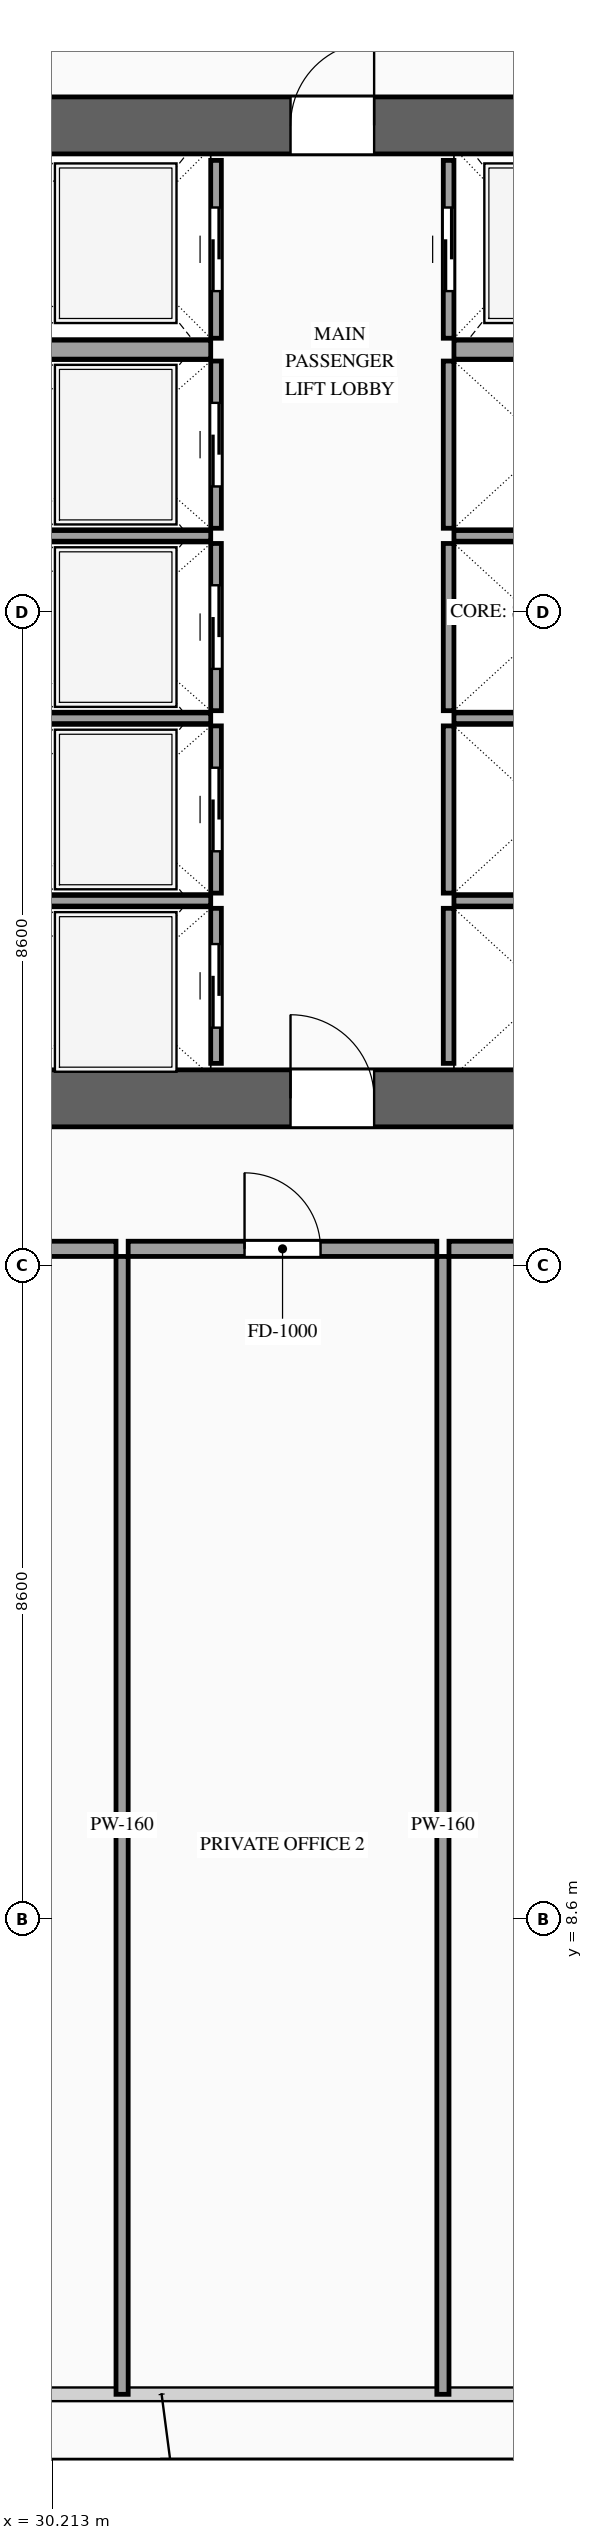
"""IFC4 building model, lengths in metres.
Left out: names, types, materials, properties, quantities, classifications, styles, units other than length and angle.
Written with IfcOpenShell. Run it as: python <this file> out.ifc"""

import sys

from ifc_helpers import new_model, si_unit, direction, frame, frame_2d, origin, place, context, subcontext, project, spatial, rectangle, extrude, source, transform, mapped, element, fill, save


model = new_model("IFC4")
c1 = context("Model", 3, precision=1e-05, world=origin(), true_north=direction((0.0, 1.0)))
c2 = subcontext(c1, "Body", "Model", "MODEL_VIEW")
j1 = project(units=[si_unit("LENGTHUNIT", "METRE"), si_unit("PLANEANGLEUNIT", "RADIAN")], contexts=[c1])
p1 = place(None, origin())
s1 = spatial("IfcSite", under=j1, at=p1, CompositionType="ELEMENT")
p2 = place(p1, origin())
s2 = spatial("IfcBuilding", under=s1, at=p2, CompositionType="ELEMENT")
p3 = place(p2, frame((0.0, 0.0, 152.4)))
s3 = spatial("IfcBuildingStorey", under=s2, at=p3, CompositionType="ELEMENT", Elevation=152.4)
p4 = place(p3, frame((23.425, 19.4, 0.0), z_axis=(0.0, 0.0, 1.0), x_axis=(1.0, 0.0, 0.0)))
e1 = element("IfcWall", 1, at=p4, inside=s3, PredefinedType="SHEAR", context=c2, shape_type="SweptSolid", body=[
    extrude(rectangle(XDim=27.15, YDim=0.75, at=frame_2d((13.575, 0.0))), origin(), (0.0, 0.0, 1.0), 3.6),
])
p5 = place(p4, frame((2.025, 0.0, 0.0)))
e2 = element("IfcOpeningElement", 2, at=p5, cuts=e1, PredefinedType="OPENING", context=c2, shape_type="SweptSolid", body=[
    extrude(rectangle(XDim=1.1, YDim=2.2, at=frame_2d((0.55, 1.1))), frame((0.0, 0.39, 0.0), z_axis=(0.0, -1.0, 0.0), x_axis=(1.0, 0.0, 0.0)), (0.0, 0.0, 1.0), 0.78),
])
p6 = place(p4, frame((9.925, 0.0, 0.0)))
e3 = element("IfcOpeningElement", 3, at=p6, cuts=e1, PredefinedType="OPENING", context=c2, shape_type="SweptSolid", body=[
    extrude(rectangle(XDim=1.1, YDim=2.2, at=frame_2d((0.55, 1.1))), frame((0.0, 0.39, 0.0), z_axis=(0.0, -1.0, 0.0), x_axis=(1.0, 0.0, 0.0)), (0.0, 0.0, 1.0), 0.78),
])
p7 = place(p4, frame((23.125, 0.0, 0.0)))
e4 = element("IfcOpeningElement", 4, at=p7, cuts=e1, PredefinedType="OPENING", context=c2, shape_type="SweptSolid", body=[
    extrude(rectangle(XDim=1.1, YDim=2.2, at=frame_2d((0.55, 1.1))), frame((0.0, 0.39, 0.0), z_axis=(0.0, -1.0, 0.0), x_axis=(1.0, 0.0, 0.0)), (0.0, 0.0, 1.0), 0.78),
])
p8 = place(p4, frame((19.745, 0.0, 0.0)))
e5 = element("IfcOpeningElement", 5, at=p8, cuts=e1, PredefinedType="OPENING", context=c2, shape_type="SweptSolid", body=[
    extrude(rectangle(XDim=0.9, YDim=2.15, at=frame_2d((0.45, 1.075))), frame((0.0, 0.39, 0.0), z_axis=(0.0, -1.0, 0.0), x_axis=(1.0, 0.0, 0.0)), (0.0, 0.0, 1.0), 0.78),
])
p9 = place(p4, frame((18.305, 0.0, 0.0)))
e6 = element("IfcOpeningElement", 6, at=p9, cuts=e1, PredefinedType="OPENING", context=c2, shape_type="SweptSolid", body=[
    extrude(rectangle(XDim=0.9, YDim=2.15, at=frame_2d((0.45, 1.075))), frame((0.0, 0.39, 0.0), z_axis=(0.0, -1.0, 0.0), x_axis=(1.0, 0.0, 0.0)), (0.0, 0.0, 1.0), 0.78),
])
p10 = place(p3, frame((23.425, 32.2, 0.0), z_axis=(0.0, 0.0, 1.0), x_axis=(1.0, 0.0, 0.0)))
e7 = element("IfcWall", 7, at=p10, inside=s3, PredefinedType="SHEAR", context=c2, shape_type="SweptSolid", body=[
    extrude(rectangle(XDim=27.15, YDim=0.75, at=frame_2d((13.575, 0.0))), origin(), (0.0, 0.0, 1.0), 3.6),
])
p11 = place(p10, frame((4.645, 0.0, 0.0)))
e8 = element("IfcOpeningElement", 8, at=p11, cuts=e7, PredefinedType="OPENING", context=c2, shape_type="SweptSolid", body=[
    extrude(rectangle(XDim=0.9, YDim=2.15, at=frame_2d((0.45, 1.075))), frame((0.0, 0.39, 0.0), z_axis=(0.0, -1.0, 0.0), x_axis=(1.0, 0.0, 0.0)), (0.0, 0.0, 1.0), 0.78),
])
p12 = place(p10, frame((9.925, 0.0, 0.0)))
e9 = element("IfcOpeningElement", 9, at=p12, cuts=e7, PredefinedType="OPENING", context=c2, shape_type="SweptSolid", body=[
    extrude(rectangle(XDim=1.1, YDim=2.2, at=frame_2d((0.55, 1.1))), frame((0.0, 0.39, 0.0), z_axis=(0.0, -1.0, 0.0), x_axis=(1.0, 0.0, 0.0)), (0.0, 0.0, 1.0), 0.78),
])
p13 = place(p10, frame((15.775, 0.0, 0.0)))
e10 = element("IfcOpeningElement", 10, at=p13, cuts=e7, PredefinedType="OPENING", context=c2, shape_type="SweptSolid", body=[
    extrude(rectangle(XDim=1.1, YDim=2.2, at=frame_2d((0.55, 1.1))), frame((0.0, 0.39, 0.0), z_axis=(0.0, -1.0, 0.0), x_axis=(1.0, 0.0, 0.0)), (0.0, 0.0, 1.0), 0.78),
])
p14 = place(p10, frame((19.745, 0.0, 0.0)))
e11 = element("IfcOpeningElement", 11, at=p14, cuts=e7, PredefinedType="OPENING", context=c2, shape_type="SweptSolid", body=[
    extrude(rectangle(XDim=0.9, YDim=2.15, at=frame_2d((0.45, 1.075))), frame((0.0, 0.39, 0.0), z_axis=(0.0, -1.0, 0.0), x_axis=(1.0, 0.0, 0.0)), (0.0, 0.0, 1.0), 0.78),
])
p15 = place(p3, frame((32.37, 19.86, 0.0), z_axis=(0.0, 0.0, 1.0), x_axis=(0.0, 1.0, 0.0)))
e12 = element("IfcWall", 12, at=p15, inside=s3, PredefinedType="SOLIDWALL", context=c2, shape_type="SweptSolid", body=[
    extrude(rectangle(XDim=2.04, YDim=0.14, at=frame_2d((1.02, 0.0))), origin(), (0.0, 0.0, 1.0), 3.38),
])
p16 = place(p15, frame((0.47, 0.0, 0.0)))
e13 = element("IfcOpeningElement", 13, at=p16, cuts=e12, PredefinedType="OPENING", context=c2, shape_type="SweptSolid", body=[
    extrude(rectangle(XDim=1.1, YDim=2.2, at=frame_2d((0.55, 1.1))), frame((0.0, 0.085, 0.0), z_axis=(0.0, -1.0, 0.0), x_axis=(1.0, 0.0, 0.0)), (0.0, 0.0, 1.0), 0.17),
])
m1 = source(origin(), c2, "Body", "SweptSolid", [
    extrude(rectangle(XDim=2.5, YDim=0.14, at=frame_2d((1.25, 0.0))), origin(), (0.0, 0.0, 1.0), 3.38),
])
p17 = place(p3, frame((29.8, 22.0, 0.0), z_axis=(0.0, 0.0, 1.0), x_axis=(1.0, 0.0, 0.0)))
e14 = element("IfcWall", 14, at=p17, inside=s3, PredefinedType="SOLIDWALL", context=c2, shape_type="MappedRepresentation", body=[
    mapped(m1, transform((0.0, 0.0, 0.0), scale=1.0)),
])
p18 = place(p3, frame((32.37, 22.1, 0.0), z_axis=(0.0, 0.0, 1.0), x_axis=(0.0, 1.0, 0.0)))
e15 = element("IfcWall", 15, at=p18, inside=s3, PredefinedType="SOLIDWALL", context=c2, shape_type="SweptSolid", body=[
    extrude(rectangle(XDim=2.2, YDim=0.14, at=frame_2d((1.1, 0.0))), origin(), (0.0, 0.0, 1.0), 3.38),
])
p19 = place(p18, frame((0.55, 0.0, 0.0)))
e16 = element("IfcOpeningElement", 16, at=p19, cuts=e15, PredefinedType="OPENING", context=c2, shape_type="SweptSolid", body=[
    extrude(rectangle(XDim=1.1, YDim=2.2, at=frame_2d((0.55, 1.1))), frame((0.0, 0.085, 0.0), z_axis=(0.0, -1.0, 0.0), x_axis=(1.0, 0.0, 0.0)), (0.0, 0.0, 1.0), 0.17),
])
p20 = place(p3, frame((29.8, 24.4, 0.0), z_axis=(0.0, 0.0, 1.0), x_axis=(1.0, 0.0, 0.0)))
e17 = element("IfcWall", 17, at=p20, inside=s3, PredefinedType="SOLIDWALL", context=c2, shape_type="MappedRepresentation", body=[
    mapped(m1, transform((0.0, 0.0, 0.0), scale=1.0)),
])
p21 = place(p3, frame((32.37, 24.5, 0.0), z_axis=(0.0, 0.0, 1.0), x_axis=(0.0, 1.0, 0.0)))
e18 = element("IfcWall", 18, at=p21, inside=s3, PredefinedType="SOLIDWALL", context=c2, shape_type="SweptSolid", body=[
    extrude(rectangle(XDim=2.2, YDim=0.14, at=frame_2d((1.1, 0.0))), origin(), (0.0, 0.0, 1.0), 3.38),
])
p22 = place(p21, frame((0.55, 0.0, 0.0)))
e19 = element("IfcOpeningElement", 19, at=p22, cuts=e18, PredefinedType="OPENING", context=c2, shape_type="SweptSolid", body=[
    extrude(rectangle(XDim=1.1, YDim=2.2, at=frame_2d((0.55, 1.1))), frame((0.0, 0.085, 0.0), z_axis=(0.0, -1.0, 0.0), x_axis=(1.0, 0.0, 0.0)), (0.0, 0.0, 1.0), 0.17),
])
p23 = place(p3, frame((29.8, 26.8, 0.0), z_axis=(0.0, 0.0, 1.0), x_axis=(1.0, 0.0, 0.0)))
e20 = element("IfcWall", 20, at=p23, inside=s3, PredefinedType="SOLIDWALL", context=c2, shape_type="MappedRepresentation", body=[
    mapped(m1, transform((0.0, 0.0, 0.0), scale=1.0)),
])
p24 = place(p3, frame((32.37, 26.9, 0.0), z_axis=(0.0, 0.0, 1.0), x_axis=(0.0, 1.0, 0.0)))
e21 = element("IfcWall", 21, at=p24, inside=s3, PredefinedType="SOLIDWALL", context=c2, shape_type="SweptSolid", body=[
    extrude(rectangle(XDim=2.2, YDim=0.14, at=frame_2d((1.1, 0.0))), origin(), (0.0, 0.0, 1.0), 3.38),
])
p25 = place(p24, frame((0.55, 0.0, 0.0)))
e22 = element("IfcOpeningElement", 22, at=p25, cuts=e21, PredefinedType="OPENING", context=c2, shape_type="SweptSolid", body=[
    extrude(rectangle(XDim=1.1, YDim=2.2, at=frame_2d((0.55, 1.1))), frame((0.0, 0.085, 0.0), z_axis=(0.0, -1.0, 0.0), x_axis=(1.0, 0.0, 0.0)), (0.0, 0.0, 1.0), 0.17),
])
p26 = place(p3, frame((32.37, 29.4, 0.0), z_axis=(0.0, 0.0, 1.0), x_axis=(0.0, 1.0, 0.0)))
e23 = element("IfcWall", 23, at=p26, inside=s3, PredefinedType="SOLIDWALL", context=c2, shape_type="SweptSolid", body=[
    extrude(rectangle(XDim=2.34, YDim=0.14, at=frame_2d((1.17, 0.0))), origin(), (0.0, 0.0, 1.0), 3.38),
])
p27 = place(p26, frame((0.62, 0.0, 0.0)))
e24 = element("IfcOpeningElement", 24, at=p27, cuts=e23, PredefinedType="OPENING", context=c2, shape_type="SweptSolid", body=[
    extrude(rectangle(XDim=1.1, YDim=2.2, at=frame_2d((0.55, 1.1))), frame((0.0, 0.085, 0.0), z_axis=(0.0, -1.0, 0.0), x_axis=(1.0, 0.0, 0.0)), (0.0, 0.0, 1.0), 0.17),
])
m2 = source(origin(), c2, "Body", "SweptSolid", [
    extrude(rectangle(XDim=2.5, YDim=0.25, at=frame_2d((1.25, 0.0))), origin(), (0.0, 0.0, 1.0), 3.38),
])
p28 = place(p3, frame((29.8, 29.25, 0.0), z_axis=(0.0, 0.0, 1.0), x_axis=(1.0, 0.0, 0.0)))
e25 = element("IfcWall", 25, at=p28, inside=s3, PredefinedType="SOLIDWALL", context=c2, shape_type="MappedRepresentation", body=[
    mapped(m2, transform((0.0, 0.0, 0.0), scale=1.0)),
])
m3 = source(origin(), c2, "Body", "SweptSolid", [
    extrude(rectangle(XDim=2.04, YDim=0.14, at=frame_2d((1.02, 0.0))), origin(), (0.0, 0.0, 1.0), 3.38),
])
p29 = place(p3, frame((35.43, 19.86, 0.0), z_axis=(0.0, 0.0, 1.0), x_axis=(0.0, 1.0, 0.0)))
e26 = element("IfcWall", 26, at=p29, inside=s3, PredefinedType="SOLIDWALL", context=c2, shape_type="MappedRepresentation", body=[
    mapped(m3, transform((0.0, 0.0, 0.0), scale=1.0)),
])
m4 = source(origin(), c2, "Body", "SweptSolid", [
    extrude(rectangle(XDim=2.4, YDim=0.14, at=frame_2d((1.2, 0.0))), origin(), (0.0, 0.0, 1.0), 3.38),
])
p30 = place(p3, frame((35.5, 22.0, 0.0), z_axis=(0.0, 0.0, 1.0), x_axis=(1.0, 0.0, 0.0)))
e27 = element("IfcWall", 27, at=p30, inside=s3, PredefinedType="SOLIDWALL", context=c2, shape_type="MappedRepresentation", body=[
    mapped(m4, transform((0.0, 0.0, 0.0), scale=1.0)),
])
m5 = source(origin(), c2, "Body", "SweptSolid", [
    extrude(rectangle(XDim=2.2, YDim=0.14, at=frame_2d((1.1, 0.0))), origin(), (0.0, 0.0, 1.0), 3.38),
])
p31 = place(p3, frame((35.43, 22.1, 0.0), z_axis=(0.0, 0.0, 1.0), x_axis=(0.0, 1.0, 0.0)))
e28 = element("IfcWall", 28, at=p31, inside=s3, PredefinedType="SOLIDWALL", context=c2, shape_type="MappedRepresentation", body=[
    mapped(m5, transform((0.0, 0.0, 0.0), scale=1.0)),
])
p32 = place(p3, frame((35.5, 24.4, 0.0), z_axis=(0.0, 0.0, 1.0), x_axis=(1.0, 0.0, 0.0)))
e29 = element("IfcWall", 29, at=p32, inside=s3, PredefinedType="SOLIDWALL", context=c2, shape_type="MappedRepresentation", body=[
    mapped(m4, transform((0.0, 0.0, 0.0), scale=1.0)),
])
p33 = place(p3, frame((35.43, 24.5, 0.0), z_axis=(0.0, 0.0, 1.0), x_axis=(0.0, 1.0, 0.0)))
e30 = element("IfcWall", 30, at=p33, inside=s3, PredefinedType="SOLIDWALL", context=c2, shape_type="MappedRepresentation", body=[
    mapped(m5, transform((0.0, 0.0, 0.0), scale=1.0)),
])
p34 = place(p3, frame((35.5, 26.8, 0.0), z_axis=(0.0, 0.0, 1.0), x_axis=(1.0, 0.0, 0.0)))
e31 = element("IfcWall", 31, at=p34, inside=s3, PredefinedType="SOLIDWALL", context=c2, shape_type="MappedRepresentation", body=[
    mapped(m4, transform((0.0, 0.0, 0.0), scale=1.0)),
])
m6 = source(origin(), c2, "Body", "SweptSolid", [
    extrude(rectangle(XDim=2.2, YDim=0.14, at=frame_2d((1.1, 0.0))), origin(), (0.0, 0.0, 1.0), 3.38),
])
p35 = place(p3, frame((35.43, 26.9, 0.0), z_axis=(0.0, 0.0, 1.0), x_axis=(0.0, 1.0, 0.0)))
e32 = element("IfcWall", 32, at=p35, inside=s3, PredefinedType="SOLIDWALL", context=c2, shape_type="MappedRepresentation", body=[
    mapped(m6, transform((0.0, 0.0, 0.0), scale=1.0)),
])
p36 = place(p3, frame((35.43, 29.4, 0.0), z_axis=(0.0, 0.0, 1.0), x_axis=(0.0, 1.0, 0.0)))
e33 = element("IfcWall", 33, at=p36, inside=s3, PredefinedType="SOLIDWALL", context=c2, shape_type="SweptSolid", body=[
    extrude(rectangle(XDim=2.34, YDim=0.14, at=frame_2d((1.17, 0.0))), origin(), (0.0, 0.0, 1.0), 3.38),
])
p37 = place(p36, frame((0.62, 0.0, 0.0)))
e34 = element("IfcOpeningElement", 34, at=p37, cuts=e33, PredefinedType="OPENING", context=c2, shape_type="SweptSolid", body=[
    extrude(rectangle(XDim=1.1, YDim=2.2, at=frame_2d((0.55, 1.1))), frame((0.0, 0.085, 0.0), z_axis=(0.0, -1.0, 0.0), x_axis=(1.0, 0.0, 0.0)), (0.0, 0.0, 1.0), 0.17),
])
m7 = source(origin(), c2, "Body", "SweptSolid", [
    extrude(rectangle(XDim=2.4, YDim=0.25, at=frame_2d((1.2, 0.0))), origin(), (0.0, 0.0, 1.0), 3.38),
])
p38 = place(p3, frame((35.5, 29.25, 0.0), z_axis=(0.0, 0.0, 1.0), x_axis=(1.0, 0.0, 0.0)))
e35 = element("IfcWall", 35, at=p38, inside=s3, PredefinedType="SOLIDWALL", context=c2, shape_type="MappedRepresentation", body=[
    mapped(m7, transform((0.0, 0.0, 0.0), scale=1.0)),
])
p39 = place(p3, frame((22.277, 17.42, 0.0), z_axis=(0.0, 0.0, 1.0), x_axis=(1.0, 0.0, 0.0)))
e36 = element("IfcWall", 36, at=p39, inside=s3, PredefinedType="PARTITIONING", context=c2, shape_type="SweptSolid", body=[
    extrude(rectangle(XDim=8.777, YDim=0.2, at=frame_2d((4.388, 0.0))), origin(), (0.0, 0.0, 1.0), 3.38),
])
p40 = place(p39, frame((3.889, 0.0, 0.0)))
e37 = element("IfcOpeningElement", 37, at=p40, cuts=e36, PredefinedType="OPENING", context=c2, shape_type="SweptSolid", body=[
    extrude(rectangle(XDim=1.0, YDim=2.2, at=frame_2d((0.5, 1.1))), frame((0.0, 0.115, 0.0), z_axis=(0.0, -1.0, 0.0), x_axis=(1.0, 0.0, 0.0)), (0.0, 0.0, 1.0), 0.23),
])
m8 = source(origin(), c2, "Body", "SweptSolid", [
    extrude(rectangle(XDim=14.97, YDim=0.16, at=frame_2d((7.485, 0.0))), origin(), (0.0, 0.0, 1.0), 3.38),
])
p41 = place(p3, frame((31.134, 2.35, 0.0), z_axis=(0.0, 0.0, 1.0), x_axis=(0.0, 1.0, 0.0)))
e38 = element("IfcWall", 38, at=p41, inside=s3, PredefinedType="PARTITIONING", context=c2, shape_type="MappedRepresentation", body=[
    mapped(m8, transform((0.0, 0.0, 0.0), scale=1.0)),
])
p42 = place(p3, frame((31.214, 17.42, 0.0), z_axis=(0.0, 0.0, 1.0), x_axis=(1.0, 0.0, 0.0)))
e39 = element("IfcWall", 39, at=p42, inside=s3, PredefinedType="PARTITIONING", context=c2, shape_type="SweptSolid", body=[
    extrude(rectangle(XDim=4.061, YDim=0.2, at=frame_2d((2.03, 0.0))), origin(), (0.0, 0.0, 1.0), 3.38),
])
p43 = place(p42, frame((1.531, 0.0, 0.0)))
e40 = element("IfcOpeningElement", 40, at=p43, cuts=e39, PredefinedType="OPENING", context=c2, shape_type="SweptSolid", body=[
    extrude(rectangle(XDim=1.0, YDim=2.2, at=frame_2d((0.5, 1.1))), frame((0.0, 0.115, 0.0), z_axis=(0.0, -1.0, 0.0), x_axis=(1.0, 0.0, 0.0)), (0.0, 0.0, 1.0), 0.23),
])
p44 = place(p3, frame((35.355, 2.35, 0.0), z_axis=(0.0, 0.0, 1.0), x_axis=(0.0, 1.0, 0.0)))
e41 = element("IfcWall", 41, at=p44, inside=s3, PredefinedType="PARTITIONING", context=c2, shape_type="MappedRepresentation", body=[
    mapped(m8, transform((0.0, 0.0, 0.0), scale=1.0)),
])
p45 = place(p3, frame((35.435, 17.42, 0.0), z_axis=(0.0, 0.0, 1.0), x_axis=(1.0, 0.0, 0.0)))
e42 = element("IfcWall", 42, at=p45, inside=s3, PredefinedType="PARTITIONING", context=c2, shape_type="SweptSolid", body=[
    extrude(rectangle(XDim=9.325, YDim=0.2, at=frame_2d((4.663, 0.0))), origin(), (0.0, 0.0, 1.0), 3.38),
])
p46 = place(p45, frame((4.162, 0.0, 0.0)))
e43 = element("IfcOpeningElement", 43, at=p46, cuts=e42, PredefinedType="OPENING", context=c2, shape_type="SweptSolid", body=[
    extrude(rectangle(XDim=1.0, YDim=2.2, at=frame_2d((0.5, 1.1))), frame((0.0, 0.115, 0.0), z_axis=(0.0, -1.0, 0.0), x_axis=(1.0, 0.0, 0.0)), (0.0, 0.0, 1.0), 0.23),
])
m9 = source(origin(), c2, "Body", "SweptSolid", [
    extrude(rectangle(XDim=1.1, YDim=2.2, at=frame_2d((0.55, 1.1))), frame((0.0, 0.025, 0.0), z_axis=(0.0, -1.0, 0.0), x_axis=(1.0, 0.0, 0.0)), (0.0, 0.0, 1.0), 0.05),
])
p47 = place(p16, origin())
e44 = element("IfcDoor", 44, at=p47, inside=s3, OperationType="SLIDING_TO_LEFT", PredefinedType="DOOR", context=c2, shape_type="MappedRepresentation", body=[
    mapped(m9, transform((0.0, 0.0, 0.0), scale=1.0)),
])
fill(e13, e44)
p48 = place(p19, origin())
e45 = element("IfcDoor", 45, at=p48, inside=s3, OperationType="SLIDING_TO_RIGHT", PredefinedType="DOOR", context=c2, shape_type="MappedRepresentation", body=[
    mapped(m9, transform((0.0, 0.0, 0.0), scale=1.0)),
])
fill(e16, e45)
p49 = place(p22, origin())
e46 = element("IfcDoor", 46, at=p49, inside=s3, OperationType="SLIDING_TO_LEFT", PredefinedType="DOOR", context=c2, shape_type="MappedRepresentation", body=[
    mapped(m9, transform((0.0, 0.0, 0.0), scale=1.0)),
])
fill(e19, e46)
p50 = place(p25, origin())
e47 = element("IfcDoor", 47, at=p50, inside=s3, OperationType="SLIDING_TO_RIGHT", PredefinedType="DOOR", context=c2, shape_type="MappedRepresentation", body=[
    mapped(m9, transform((0.0, 0.0, 0.0), scale=1.0)),
])
fill(e22, e47)
p51 = place(p27, origin())
e48 = element("IfcDoor", 48, at=p51, inside=s3, OperationType="SLIDING_TO_LEFT", PredefinedType="DOOR", context=c2, shape_type="MappedRepresentation", body=[
    mapped(m9, transform((0.0, 0.0, 0.0), scale=1.0)),
])
fill(e24, e48)
p52 = place(p37, origin())
e49 = element("IfcDoor", 49, at=p52, inside=s3, OperationType="SLIDING_TO_RIGHT", PredefinedType="DOOR", context=c2, shape_type="MappedRepresentation", body=[
    mapped(m9, transform((0.0, 0.0, 0.0), scale=1.0)),
])
fill(e34, e49)
m10 = source(origin(), c2, "Body", "SweptSolid", [
    extrude(rectangle(XDim=1.1, YDim=2.2, at=frame_2d((0.55, 1.1))), frame((0.0, 0.025, 0.0), z_axis=(0.0, -1.0, 0.0), x_axis=(1.0, 0.0, 0.0)), (0.0, 0.0, 1.0), 0.05),
])
p53 = place(p6, origin())
e50 = element("IfcDoor", 50, at=p53, inside=s3, OperationType="SINGLE_SWING_LEFT", PredefinedType="DOOR", context=c2, shape_type="MappedRepresentation", body=[
    mapped(m10, transform((0.0, 0.0, 0.0), scale=1.0)),
])
fill(e3, e50)
p54 = place(p12, origin())
e51 = element("IfcDoor", 51, at=p54, inside=s3, OperationType="SINGLE_SWING_RIGHT", PredefinedType="DOOR", context=c2, shape_type="MappedRepresentation", body=[
    mapped(m10, transform((0.0, 0.0, 0.0), scale=1.0)),
])
fill(e9, e51)
m11 = source(origin(), c2, "Body", "SweptSolid", [
    extrude(rectangle(XDim=1.0, YDim=2.2, at=frame_2d((0.5, 1.1))), frame((0.0, 0.025, 0.0), z_axis=(0.0, -1.0, 0.0), x_axis=(1.0, 0.0, 0.0)), (0.0, 0.0, 1.0), 0.05),
])
p55 = place(p43, origin())
e52 = element("IfcDoor", 52, at=p55, inside=s3, OperationType="SINGLE_SWING_LEFT", PredefinedType="DOOR", context=c2, shape_type="MappedRepresentation", body=[
    mapped(m11, transform((0.0, 0.0, 0.0), scale=1.0)),
])
fill(e40, e52)
save(model, sys.argv[1])
